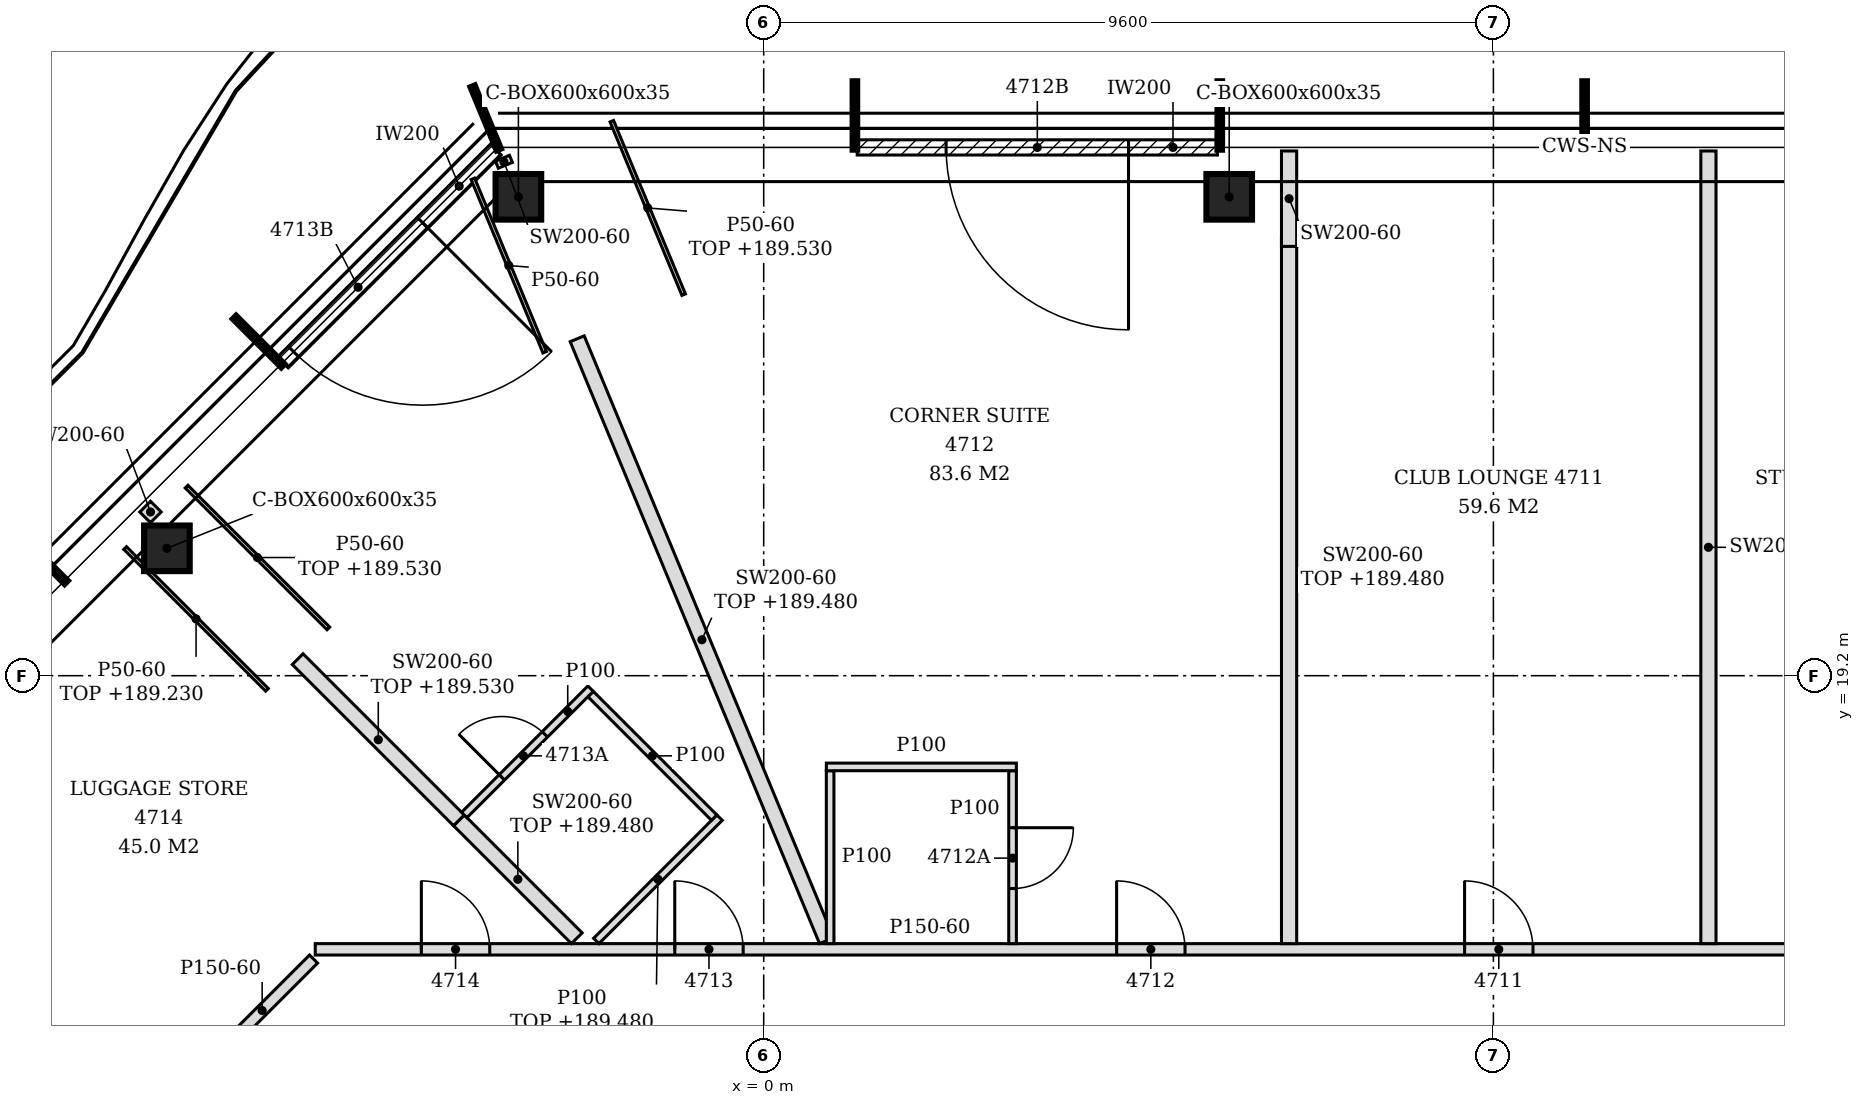
"""IFC4 building model, lengths in metres.
Left out: names, types, materials, properties, quantities, classifications, styles, units other than length and angle.
Written with IfcOpenShell. Run it as: python <this file> out.ifc"""

import sys

from ifc_helpers import new_model, si_unit, direction, frame, frame_2d, origin, origin_2d, place, context, subcontext, project, spatial, polyline, rectangle, hollow_rectangle, outline, extrude, clip, halfspace, element, fill, save


model = new_model("IFC4")
c1 = context("Model", 3, precision=1e-05, world=origin(), true_north=direction((0.0, 1.0)))
c2 = subcontext(c1, "Body", "Model", "MODEL_VIEW")
j1 = project(units=[si_unit("LENGTHUNIT", "METRE"), si_unit("PLANEANGLEUNIT", "RADIAN")], contexts=[c1])
p1 = place(None, origin())
s1 = spatial("IfcSite", under=j1, at=p1, CompositionType="ELEMENT")
p2 = place(p1, origin())
s2 = spatial("IfcBuilding", under=s1, at=p2, CompositionType="ELEMENT")
p3 = place(p2, frame((0.0, 0.0, 186.6)))
s3 = spatial("IfcBuildingStorey", under=s2, at=p3, CompositionType="ELEMENT", Elevation=186.6)
p4 = place(p3, frame((6.124, 25.5, -0.15), z_axis=(0.387212850535, -0.258161908255, 0.885109392961), x_axis=(0.554729959787, 0.832030451194, 0.0)))
e1 = element("IfcColumn", 1, at=p4, inside=s3, PredefinedType="COLUMN", context=c2, shape_type="Clipping", body=[
    clip(extrude(hollow_rectangle(XDim=0.6, YDim=0.6, WallThickness=0.035, at=origin_2d()), origin(), (0.0, 0.0, 1.0), 4.067), halfspace(frame((0.0, 0.0, 4.049), z_axis=(0.0, 0.0, 1.0), x_axis=(1.0, 0.0, 0.0)), False)),
])
p5 = place(p3, frame((-3.227, 25.5, -0.15), z_axis=(0.38726387287, -0.258155907814, 0.885088820419), x_axis=(0.554670435147, 0.832070134288, 0.0)))
e2 = element("IfcColumn", 2, at=p5, inside=s3, PredefinedType="COLUMN", context=c2, shape_type="Clipping", body=[
    clip(extrude(hollow_rectangle(XDim=0.6, YDim=0.6, WallThickness=0.035, at=origin_2d()), origin(), (0.0, 0.0, 1.0), 4.067), halfspace(frame((0.0, 0.0, 4.049), z_axis=(0.0, 0.0, 1.0), x_axis=(1.0, 0.0, 0.0)), False)),
])
p6 = place(p3, frame((-7.852, 20.876, -0.15), z_axis=(0.387212850535, -0.258161908255, 0.885109392961), x_axis=(0.554729959787, 0.832030451194, 0.0)))
e3 = element("IfcColumn", 3, at=p6, inside=s3, PredefinedType="COLUMN", context=c2, shape_type="Clipping", body=[
    clip(extrude(hollow_rectangle(XDim=0.6, YDim=0.6, WallThickness=0.035, at=origin_2d()), origin(), (0.0, 0.0, 1.0), 4.067), halfspace(frame((0.0, 0.0, 4.049), z_axis=(0.0, 0.0, 1.0), x_axis=(1.0, 0.0, 0.0)), False)),
])
p7 = place(p3, frame((5.97, 26.15, 0.0), z_axis=(0.0, 0.0, 1.0), x_axis=(-1.0, 0.0, 0.0)))
e4 = element("IfcWall", 4, at=p7, inside=s3, PredefinedType="NOTDEFINED", context=c2, shape_type="SweptSolid", body=[
    extrude(rectangle(XDim=4.74, YDim=0.2, at=frame_2d((2.37, 0.0))), origin(), (0.0, 0.0, 1.0), 3.45),
])
p8 = place(p7, frame((1.17, 0.0, 0.0)))
e5 = element("IfcOpeningElement", 5, at=p8, cuts=e4, PredefinedType="OPENING", context=c2, shape_type="SweptSolid", body=[
    extrude(rectangle(XDim=2.4, YDim=2.4, at=frame_2d((1.2, 1.2))), frame((0.0, 0.11, 0.0), z_axis=(0.0, -1.0, 0.0), x_axis=(1.0, 0.0, 0.0)), (0.0, 0.0, 1.0), 0.22),
])
p9 = place(p3, frame((-3.525, 26.122, 0.0), z_axis=(0.0, 0.0, 1.0), x_axis=(-0.707106781187, -0.707106781187, 0.0)))
e6 = element("IfcWall", 6, at=p9, inside=s3, PredefinedType="NOTDEFINED", context=c2, shape_type="SweptSolid", body=[
    extrude(rectangle(XDim=3.962, YDim=0.2, at=frame_2d((1.981, 0.0))), origin(), (0.0, 0.0, 1.0), 3.45),
])
p10 = place(p9, frame((1.362, 0.0, 0.0)))
e7 = element("IfcOpeningElement", 7, at=p10, cuts=e6, PredefinedType="OPENING", context=c2, shape_type="SweptSolid", body=[
    extrude(rectangle(XDim=2.4, YDim=2.4, at=frame_2d((1.2, 1.2))), frame((0.0, 0.11, 0.0), z_axis=(0.0, -1.0, 0.0), x_axis=(1.0, 0.0, 0.0)), (0.0, 0.0, 1.0), 0.22),
])
p11 = place(p3, frame((-7.346, 11.384, 0.0), z_axis=(0.0, 0.0, 1.0), x_axis=(-0.707132095121, 0.707081466346, 0.0)))
e8 = element("IfcWall", 8, at=p11, inside=s3, PredefinedType="PARTITIONING", context=c2, shape_type="SweptSolid", body=[
    extrude(rectangle(XDim=4.822, YDim=0.2, at=frame_2d((2.411, 0.0))), origin(), (0.0, 0.0, 1.0), 3.45),
])
p12 = place(p3, frame((-7.275, 14.119, 0.0), z_axis=(0.0, 0.0, 1.0), x_axis=(0.707042977282, 0.707170579335, 0.0)))
e9 = element("IfcWall", 9, at=p12, inside=s3, PredefinedType="PARTITIONING", context=c2, shape_type="SweptSolid", body=[
    extrude(rectangle(XDim=1.913, YDim=0.15, at=frame_2d((0.957, 0.0))), origin(), (0.0, 0.0, 1.0), 3.45),
])
p13 = place(p3, frame((-5.9, 15.6, 0.0), z_axis=(0.0, 0.0, 1.0), x_axis=(1.0, 0.0, 0.0)))
e10 = element("IfcWall", 10, at=p13, inside=s3, PredefinedType="PARTITIONING", context=c2, shape_type="SweptSolid", body=[
    extrude(outline(polyline([(0.0, 0.0), (26.2, 0.0), (26.2, 2.88), (25.25, 2.88), (25.248, 2.83), (24.95, 2.83), (24.948, 2.88), (13.25, 2.88), (13.248, 2.83), (12.95, 2.83), (12.948, 2.88), (1.25, 2.88), (1.248, 2.93), (0.95, 2.93), (0.948, 3.45), (0.0, 3.45), (0.0, 0.0)])), frame((0.0, 0.075, 0.0), z_axis=(0.0, -1.0, 0.0), x_axis=(1.0, 0.0, 0.0)), (0.0, 0.0, 1.0), 0.15),
])
p14 = place(p13, frame((23.678, 0.0, 0.0)))
e11 = element("IfcOpeningElement", 11, at=p14, cuts=e10, PredefinedType="OPENING", context=c2, shape_type="SweptSolid", body=[
    extrude(rectangle(XDim=0.9, YDim=2.1, at=frame_2d((0.45, 1.05))), frame((0.0, 0.085, 0.0), z_axis=(0.0, -1.0, 0.0), x_axis=(1.0, 0.0, 0.0)), (0.0, 0.0, 1.0), 0.17),
])
p15 = place(p13, frame((19.796, 0.0, 0.0)))
e12 = element("IfcOpeningElement", 12, at=p15, cuts=e10, PredefinedType="OPENING", context=c2, shape_type="SweptSolid", body=[
    extrude(rectangle(XDim=0.9, YDim=2.1, at=frame_2d((0.45, 1.05))), frame((0.0, 0.085, 0.0), z_axis=(0.0, -1.0, 0.0), x_axis=(1.0, 0.0, 0.0)), (0.0, 0.0, 1.0), 0.17),
])
p16 = place(p13, frame((15.121, 0.0, 0.0)))
e13 = element("IfcOpeningElement", 13, at=p16, cuts=e10, PredefinedType="OPENING", context=c2, shape_type="SweptSolid", body=[
    extrude(rectangle(XDim=0.9, YDim=2.1, at=frame_2d((0.45, 1.05))), frame((0.0, 0.085, 0.0), z_axis=(0.0, -1.0, 0.0), x_axis=(1.0, 0.0, 0.0)), (0.0, 0.0, 1.0), 0.17),
])
p17 = place(p13, frame((10.543, 0.0, 0.0)))
e14 = element("IfcOpeningElement", 14, at=p17, cuts=e10, PredefinedType="OPENING", context=c2, shape_type="SweptSolid", body=[
    extrude(rectangle(XDim=0.9, YDim=2.1, at=frame_2d((0.45, 1.05))), frame((0.0, 0.085, 0.0), z_axis=(0.0, -1.0, 0.0), x_axis=(1.0, 0.0, 0.0)), (0.0, 0.0, 1.0), 0.17),
])
p18 = place(p13, frame((4.73, 0.0, 0.0)))
e15 = element("IfcOpeningElement", 15, at=p18, cuts=e10, PredefinedType="OPENING", context=c2, shape_type="SweptSolid", body=[
    extrude(rectangle(XDim=0.9, YDim=2.1, at=frame_2d((0.45, 1.05))), frame((0.0, 0.085, 0.0), z_axis=(0.0, -1.0, 0.0), x_axis=(1.0, 0.0, 0.0)), (0.0, 0.0, 1.0), 0.17),
])
p19 = place(p13, frame((1.396, 0.0, 0.0)))
e16 = element("IfcOpeningElement", 16, at=p19, cuts=e10, PredefinedType="OPENING", context=c2, shape_type="SweptSolid", body=[
    extrude(rectangle(XDim=0.9, YDim=2.1, at=frame_2d((0.45, 1.05))), frame((0.0, 0.085, 0.0), z_axis=(0.0, -1.0, 0.0), x_axis=(1.0, 0.0, 0.0)), (0.0, 0.0, 1.0), 0.17),
])
p20 = place(p3, frame((-2.459, 15.746, 0.0), z_axis=(0.0, 0.0, 1.0), x_axis=(-0.707051140727, 0.707162417268, 0.0)))
e17 = element("IfcWall", 17, at=p20, inside=s3, PredefinedType="PARTITIONING", context=c2, shape_type="SweptSolid", body=[
    extrude(rectangle(XDim=2.194, YDim=0.2, at=frame_2d((1.097, 0.0))), origin(), (0.0, 0.0, 1.0), 2.88),
])
p21 = place(p3, frame((-2.203, 15.71, 0.0), z_axis=(0.0, 0.0, 1.0), x_axis=(0.707106781187, 0.707106781187, 0.0)))
e18 = element("IfcWall", 18, at=p21, inside=s3, PredefinedType="PARTITIONING", context=c2, shape_type="SweptSolid", body=[
    extrude(rectangle(XDim=2.294, YDim=0.1, at=frame_2d((1.147, 0.0))), origin(), (0.0, 0.0, 1.0), 2.88),
])
p22 = place(p3, frame((0.827, 15.713, 0.0), z_axis=(0.0, 0.0, 1.0), x_axis=(-0.382735813185, 0.923857833925, 0.0)))
e19 = element("IfcWall", 19, at=p22, inside=s3, PredefinedType="PARTITIONING", context=c2, shape_type="SweptSolid", body=[
    extrude(rectangle(XDim=8.572, YDim=0.2, at=frame_2d((4.286, 0.0))), origin(), (0.0, 0.0, 1.0), 2.88),
])
p23 = place(p3, frame((0.874, 15.675, 0.0), z_axis=(0.0, 0.0, 1.0), x_axis=(0.0, 1.0, 0.0)))
e20 = element("IfcWall", 20, at=p23, inside=s3, PredefinedType="PARTITIONING", context=c2, shape_type="SweptSolid", body=[
    extrude(outline(polyline([(0.0, 0.0), (2.275, 0.0), (2.275, 3.45), (0.18, 3.45), (0.178, 2.88), (0.0, 2.88), (0.0, 0.0)])), frame((0.0, 0.05, 0.0), z_axis=(0.0, -1.0, 0.0), x_axis=(1.0, 0.0, 0.0)), (0.0, 0.0, 1.0), 0.1),
])
p24 = place(p3, frame((3.274, 15.675, 0.0), z_axis=(0.0, 0.0, 1.0), x_axis=(0.0, 1.0, 0.0)))
e21 = element("IfcWall", 21, at=p24, inside=s3, PredefinedType="PARTITIONING", context=c2, shape_type="SweptSolid", body=[
    extrude(outline(polyline([(0.0, 0.0), (2.275, 0.0), (2.275, 3.45), (0.18, 3.45), (0.178, 2.88), (0.0, 2.88), (0.0, 0.0)])), frame((0.0, 0.05, 0.0), z_axis=(0.0, -1.0, 0.0), x_axis=(1.0, 0.0, 0.0)), (0.0, 0.0, 1.0), 0.1),
])
p25 = place(p24, frame((0.725, 0.0, 0.0)))
e22 = element("IfcOpeningElement", 22, at=p25, cuts=e21, PredefinedType="OPENING", context=c2, shape_type="SweptSolid", body=[
    extrude(rectangle(XDim=0.8, YDim=2.1, at=frame_2d((0.4, 1.05))), frame((0.0, 0.06, 0.0), z_axis=(0.0, -1.0, 0.0), x_axis=(1.0, 0.0, 0.0)), (0.0, 0.0, 1.0), 0.12),
])
p26 = place(p3, frame((6.912, 15.675, 0.0), z_axis=(0.0, 0.0, 1.0), x_axis=(0.0, 1.0, 0.0)))
e23 = element("IfcWall", 23, at=p26, inside=s3, PredefinedType="PARTITIONING", context=c2, shape_type="SweptSolid", body=[
    extrude(outline(polyline([(0.0, 0.0), (9.286, 0.0), (9.286, 0.862), (8.873, 1.725), (8.873, 2.587), (8.873, 2.88), (0.0, 2.88), (0.0, 2.587), (0.0, 1.725), (0.0, 0.862), (0.0, 0.0)])), frame((0.0, 0.1, 0.0), z_axis=(0.0, -1.0, 0.0), x_axis=(1.0, 0.0, 0.0)), (0.0, 0.0, 1.0), 0.2),
])
p27 = place(p3, frame((12.429, 15.675, 0.0), z_axis=(0.0, 0.0, 1.0), x_axis=(0.0, 1.0, 0.0)))
e24 = element("IfcWall", 24, at=p27, inside=s3, PredefinedType="PARTITIONING", context=c2, shape_type="SweptSolid", body=[
    extrude(outline(polyline([(0.0, 0.0), (10.428, 0.0), (10.428, 3.45), (8.925, 3.45), (8.923, 2.93), (8.625, 2.93), (8.623, 3.45), (4.98, 3.45), (4.978, 2.88), (4.77, 2.88), (4.768, 3.45), (0.18, 3.45), (0.178, 2.88), (0.0, 2.88), (0.0, 0.0)])), frame((0.0, 0.1, 0.0), z_axis=(0.0, -1.0, 0.0), x_axis=(1.0, 0.0, 0.0)), (0.0, 0.0, 1.0), 0.2),
])
p28 = place(p3, frame((-4.01, 17.297, 0.0), z_axis=(0.0, 0.0, 1.0), x_axis=(-0.707188174772, 0.707025378231, 0.0)))
e25 = element("IfcWall", 25, at=p28, inside=s3, PredefinedType="PARTITIONING", context=c2, shape_type="SweptSolid", body=[
    extrude(rectangle(XDim=2.999, YDim=0.2, at=frame_2d((1.5, 0.0))), origin(), (0.0, 0.0, 1.0), 2.93),
])
p29 = place(p3, frame((-0.651, 17.333, 0.0), z_axis=(0.0, 0.0, 1.0), x_axis=(-0.707159861304, 0.707053697085, 0.0)))
e26 = element("IfcWall", 26, at=p29, inside=s3, PredefinedType="PARTITIONING", context=c2, shape_type="SweptSolid", body=[
    extrude(rectangle(XDim=2.3, YDim=0.1, at=frame_2d((1.15, 0.0))), origin(), (0.0, 0.0, 1.0), 3.45),
])
p30 = place(p3, frame((-3.939, 17.368, 0.0), z_axis=(0.0, 0.0, 1.0), x_axis=(0.707106781187, 0.707106781187, 0.0)))
e27 = element("IfcWall", 27, at=p30, inside=s3, PredefinedType="PARTITIONING", context=c2, shape_type="SweptSolid", body=[
    extrude(rectangle(XDim=2.35, YDim=0.1, at=frame_2d((1.175, 0.0))), origin(), (0.0, 0.0, 1.0), 3.45),
])
p31 = place(p30, frame((0.7, 0.0, 0.0)))
e28 = element("IfcOpeningElement", 28, at=p31, cuts=e27, PredefinedType="OPENING", context=c2, shape_type="SweptSolid", body=[
    extrude(rectangle(XDim=0.8, YDim=2.1, at=frame_2d((0.4, 1.05))), frame((0.0, 0.06, 0.0), z_axis=(0.0, -1.0, 0.0), x_axis=(1.0, 0.0, 0.0)), (0.0, 0.0, 1.0), 0.12),
])
p32 = place(p3, frame((0.824, 18.0, 0.0), z_axis=(0.0, 0.0, 1.0), x_axis=(1.0, 0.0, 0.0)))
e29 = element("IfcWall", 29, at=p32, inside=s3, PredefinedType="PARTITIONING", context=c2, shape_type="SweptSolid", body=[
    extrude(rectangle(XDim=2.5, YDim=0.1, at=frame_2d((1.25, 0.0))), origin(), (0.0, 0.0, 1.0), 3.45),
])
p33 = place(p3, frame((-7.997, 21.283, 0.0), z_axis=(0.0, 0.0, 1.0), x_axis=(-0.706492173294, 0.707720855334, 0.0)))
e30 = element("IfcWall", 30, at=p33, inside=s3, PredefinedType="PARTITIONING", context=c2, shape_type="SweptSolid", body=[
    extrude(rectangle(XDim=0.199, YDim=0.2, at=frame_2d((0.099, 0.0))), origin(), (0.0, 0.0, 1.0), 3.45),
])
p34 = place(p3, frame((6.912, 24.848, 0.0), z_axis=(0.0, 0.0, 1.0), x_axis=(0.0, 1.0, 0.0)))
e31 = element("IfcWall", 31, at=p34, inside=s3, PredefinedType="PARTITIONING", context=c2, shape_type="SweptSolid", body=[
    extrude(outline(polyline([(0.554, 0.0), (1.255, 0.0), (1.255, 0.862), (1.255, 1.725), (1.255, 2.587), (1.255, 3.45), (0.0, 3.45), (0.0, 2.587), (0.543, 1.725), (0.554, 0.862), (0.554, 0.0)])), frame((0.0, 0.1, 0.0), z_axis=(0.0, -1.0, 0.0), x_axis=(1.0, 0.0, 0.0)), (0.0, 0.0, 1.0), 0.2),
])
p35 = place(p3, frame((-3.399, 25.914, 0.0), z_axis=(0.0, 0.0, 1.0), x_axis=(-0.384272142986, 0.923219865539, 0.0)))
e32 = element("IfcWall", 32, at=p35, inside=s3, PredefinedType="PARTITIONING", context=c2, shape_type="SweptSolid", body=[
    extrude(rectangle(XDim=0.101, YDim=0.2, at=frame_2d((0.051, 0.0))), origin(), (0.0, 0.0, 1.0), 3.45),
])
p36 = place(p3, frame((-1.053, 24.213, 0.0), z_axis=(0.0, 0.0, 1.0), x_axis=(-0.382712608723, 0.923867446728, 0.0)))
e33 = element("IfcWall", 33, at=p36, inside=s3, PredefinedType="PARTITIONING", context=c2, shape_type="SweptSolid", body=[
    extrude(rectangle(XDim=2.47, YDim=0.05, at=frame_2d((1.235, 0.0))), origin(), (0.0, 0.0, 1.0), 2.93),
])
p37 = place(p3, frame((-2.881, 23.455, 0.0), z_axis=(0.0, 0.0, 1.0), x_axis=(-0.382712608723, 0.923867446728, 0.0)))
e34 = element("IfcWall", 34, at=p37, inside=s3, PredefinedType="PARTITIONING", context=c2, shape_type="SweptSolid", body=[
    extrude(rectangle(XDim=2.47, YDim=0.05, at=frame_2d((1.235, 0.0))), origin(), (0.0, 0.0, 1.0), 3.45),
])
p38 = place(p3, frame((-6.535, 19.014, 0.0), z_axis=(0.0, 0.0, 1.0), x_axis=(-0.707199304153, 0.707014246112, 0.0)))
e35 = element("IfcWall", 35, at=p38, inside=s3, PredefinedType="PARTITIONING", context=c2, shape_type="SweptSolid", body=[
    extrude(rectangle(XDim=2.638, YDim=0.05, at=frame_2d((1.319, 0.0))), origin(), (0.0, 0.0, 1.0), 2.63),
])
p39 = place(p3, frame((-5.727, 19.822, 0.0), z_axis=(0.0, 0.0, 1.0), x_axis=(-0.707199304153, 0.707014246112, 0.0)))
e36 = element("IfcWall", 36, at=p39, inside=s3, PredefinedType="PARTITIONING", context=c2, shape_type="SweptSolid", body=[
    extrude(rectangle(XDim=2.638, YDim=0.05, at=frame_2d((1.319, 0.0))), origin(), (0.0, 0.0, 1.0), 2.93),
])
p40 = place(p8, origin())
e37 = element("IfcDoor", 37, at=p40, inside=s3, OperationType="SINGLE_SWING_LEFT", PredefinedType="DOOR", context=c2, shape_type="SweptSolid", body=[
    extrude(rectangle(XDim=2.4, YDim=2.4, at=frame_2d((1.2, 1.2))), frame((0.0, 0.025, 0.0), z_axis=(0.0, -1.0, 0.0), x_axis=(1.0, 0.0, 0.0)), (0.0, 0.0, 1.0), 0.05),
])
fill(e5, e37)
p41 = place(p10, origin())
e38 = element("IfcDoor", 38, at=p41, inside=s3, OperationType="SINGLE_SWING_LEFT", PredefinedType="DOOR", context=c2, shape_type="SweptSolid", body=[
    extrude(rectangle(XDim=2.4, YDim=2.4, at=frame_2d((1.2, 1.2))), frame((0.0, 0.025, 0.0), z_axis=(0.0, -1.0, 0.0), x_axis=(1.0, 0.0, 0.0)), (0.0, 0.0, 1.0), 0.05),
])
fill(e7, e38)
p42 = place(p16, origin())
e39 = element("IfcDoor", 39, at=p42, inside=s3, OperationType="SINGLE_SWING_LEFT", PredefinedType="DOOR", context=c2, shape_type="SweptSolid", body=[
    extrude(rectangle(XDim=0.9, YDim=2.1, at=frame_2d((0.45, 1.05))), frame((0.0, 0.025, 0.0), z_axis=(0.0, -1.0, 0.0), x_axis=(1.0, 0.0, 0.0)), (0.0, 0.0, 1.0), 0.05),
])
fill(e13, e39)
p43 = place(p17, origin())
e40 = element("IfcDoor", 40, at=p43, inside=s3, OperationType="SINGLE_SWING_LEFT", PredefinedType="DOOR", context=c2, shape_type="SweptSolid", body=[
    extrude(rectangle(XDim=0.9, YDim=2.1, at=frame_2d((0.45, 1.05))), frame((0.0, 0.025, 0.0), z_axis=(0.0, -1.0, 0.0), x_axis=(1.0, 0.0, 0.0)), (0.0, 0.0, 1.0), 0.05),
])
fill(e14, e40)
p44 = place(p25, frame((0.8, 0.0, 0.0), z_axis=(0.0, 0.0, 1.0), x_axis=(-1.0, 0.0, 0.0)))
e41 = element("IfcDoor", 41, at=p44, inside=s3, OperationType="SINGLE_SWING_LEFT", PredefinedType="DOOR", context=c2, shape_type="SweptSolid", body=[
    extrude(rectangle(XDim=0.8, YDim=2.1, at=frame_2d((0.4, 1.05))), frame((0.0, 0.025, 0.0), z_axis=(0.0, -1.0, 0.0), x_axis=(1.0, 0.0, 0.0)), (0.0, 0.0, 1.0), 0.05),
])
fill(e22, e41)
p45 = place(p18, origin())
e42 = element("IfcDoor", 42, at=p45, inside=s3, OperationType="SINGLE_SWING_LEFT", PredefinedType="DOOR", context=c2, shape_type="SweptSolid", body=[
    extrude(rectangle(XDim=0.9, YDim=2.1, at=frame_2d((0.45, 1.05))), frame((0.0, 0.025, 0.0), z_axis=(0.0, -1.0, 0.0), x_axis=(1.0, 0.0, 0.0)), (0.0, 0.0, 1.0), 0.05),
])
fill(e15, e42)
p46 = place(p31, origin())
e43 = element("IfcDoor", 43, at=p46, inside=s3, OperationType="SINGLE_SWING_LEFT", PredefinedType="DOOR", context=c2, shape_type="SweptSolid", body=[
    extrude(rectangle(XDim=0.8, YDim=2.1, at=frame_2d((0.4, 1.05))), frame((0.0, 0.025, 0.0), z_axis=(0.0, -1.0, 0.0), x_axis=(1.0, 0.0, 0.0)), (0.0, 0.0, 1.0), 0.05),
])
fill(e28, e43)
p47 = place(p19, origin())
e44 = element("IfcDoor", 44, at=p47, inside=s3, OperationType="SINGLE_SWING_LEFT", PredefinedType="DOOR", context=c2, shape_type="SweptSolid", body=[
    extrude(rectangle(XDim=0.9, YDim=2.1, at=frame_2d((0.45, 1.05))), frame((0.0, 0.025, 0.0), z_axis=(0.0, -1.0, 0.0), x_axis=(1.0, 0.0, 0.0)), (0.0, 0.0, 1.0), 0.05),
])
fill(e16, e44)
save(model, sys.argv[1])
